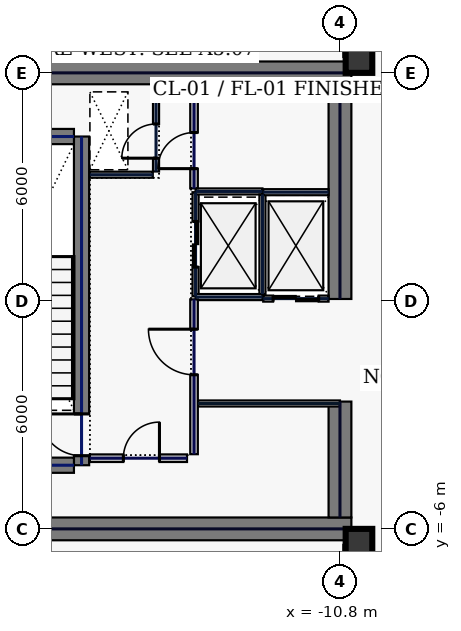
"""IFC4 building model, lengths in metres.
Left out: names, types, materials, properties, quantities, classifications, styles, units other than length and angle.
Written with IfcOpenShell. Run it as: python <this file> out.ifc"""

import sys

from ifc_helpers import new_model, si_unit, direction, frame, frame_2d, origin, origin_2d, place, context, subcontext, project, spatial, rectangle, hollow_rectangle, extrude, element, fill, save


model = new_model("IFC4")
c1 = context("Model", 3, precision=1e-05, world=origin(), true_north=direction((0.0, 1.0)))
c2 = subcontext(c1, "Body", "Model", "MODEL_VIEW")
j1 = project(units=[si_unit("LENGTHUNIT", "METRE"), si_unit("PLANEANGLEUNIT", "RADIAN")], contexts=[c1])
p1 = place(None, origin())
s1 = spatial("IfcSite", under=j1, at=p1, CompositionType="ELEMENT")
p2 = place(p1, origin())
s2 = spatial("IfcBuilding", under=s1, at=p2, CompositionType="ELEMENT")
p3 = place(p2, frame((0.0, 0.0, 321.0)))
s3 = spatial("IfcBuildingStorey", under=s2, at=p3, CompositionType="ELEMENT", Elevation=321.0)
for number, where, z_axis, x_axis in (
    (1, (-22.0, 6.0, 0.0), (0.0, 0.0, 1.0), (1.0, 0.0, 0.0)),
    (2, (-22.0, -6.0, 0.0), (0.0, 0.0, 1.0), (1.0, 0.0, 0.0)),
):
    element("IfcWall", number, at=place(p3, frame(where, z_axis=z_axis, x_axis=x_axis)), inside=s3, PredefinedType="SHEAR", context=c2, shape_type="SweptSolid", body=[
        extrude(rectangle(XDim=11.5, YDim=0.6, at=frame_2d((5.75, 0.0))), origin(), (0.0, 0.0, 1.0), 3.74),
    ])
p4 = place(p3, frame((-10.8, -5.7, 0.0), z_axis=(0.0, 0.0, 1.0), x_axis=(0.0, 1.0, 0.0)))
e3 = element("IfcWall", 3, at=p4, inside=s3, PredefinedType="SHEAR", context=c2, shape_type="SweptSolid", body=[
    extrude(rectangle(XDim=3.05, YDim=0.6, at=frame_2d((1.525, 0.0))), origin(), (0.0, 0.0, 1.0), 3.74),
])
p5 = place(p3, frame((-10.8, 0.05, 0.0), z_axis=(0.0, 0.0, 1.0), x_axis=(0.0, 1.0, 0.0)))
e4 = element("IfcWall", 4, at=p5, inside=s3, PredefinedType="SHEAR", context=c2, shape_type="SweptSolid", body=[
    extrude(rectangle(XDim=5.65, YDim=0.6, at=frame_2d((2.825, 0.0))), origin(), (0.0, 0.0, 1.0), 3.74),
])
p6 = place(p3, frame((-17.6, -4.325, 0.0), z_axis=(0.0, 0.0, 1.0), x_axis=(0.0, 1.0, 0.0)))
e5 = element("IfcWall", 5, at=p6, inside=s3, PredefinedType="SHEAR", context=c2, shape_type="SweptSolid", body=[
    extrude(rectangle(XDim=8.65, YDim=0.4, at=frame_2d((4.325, 0.0))), origin(), (0.0, 0.0, 1.0), 3.74),
])
p7 = place(p6, frame((0.25, 0.0, 0.0)))
e6 = element("IfcOpeningElement", 6, at=p7, cuts=e5, PredefinedType="OPENING", context=c2, shape_type="SweptSolid", body=[
    extrude(rectangle(XDim=1.1, YDim=2.2, at=frame_2d((0.55, 1.1))), frame((0.0, 0.21, 0.0), z_axis=(0.0, -1.0, 0.0), x_axis=(1.0, 0.0, 0.0)), (0.0, 0.0, 1.0), 0.42),
])
for number, where, z_axis, x_axis in (
    (7, (-21.2, -4.325, 0.0), (0.0, 0.0, 1.0), (1.0, 0.0, 0.0)),
    (8, (-21.2, 4.325, 0.0), (0.0, 0.0, 1.0), (1.0, 0.0, 0.0)),
):
    element("IfcWall", number, at=place(p3, frame(where, z_axis=z_axis, x_axis=x_axis)), inside=s3, PredefinedType="SHEAR", context=c2, shape_type="SweptSolid", body=[
        extrude(rectangle(XDim=3.4, YDim=0.4, at=frame_2d((1.7, 0.0))), origin(), (0.0, 0.0, 1.0), 3.74),
    ])
for number, where, z_axis, x_axis in (
    (9, (-10.3, -6.35, 0.0), (0.0, 0.0, 1.0), (1.0, 0.0, 0.0)),
    (10, (-10.3, 6.35, 0.0), (0.0, 0.0, 1.0), (1.0, 0.0, 0.0)),
):
    element("IfcColumn", number, at=place(p3, frame(where, z_axis=z_axis, x_axis=x_axis)), inside=s3, PredefinedType="COLUMN", context=c2, shape_type="SweptSolid", body=[
        extrude(hollow_rectangle(XDim=0.7, YDim=0.7, WallThickness=0.032, at=origin_2d()), origin(), (0.0, 0.0, 1.0), 3.74),
    ])
p8 = place(p3, frame((-14.6, 0.12, 0.0), z_axis=(0.0, 0.0, 1.0), x_axis=(0.0, 1.0, 0.0)))
e11 = element("IfcWall", 11, at=p8, inside=s3, PredefinedType="PARTITIONING", context=c2, shape_type="SweptSolid", body=[
    extrude(rectangle(XDim=2.74, YDim=0.16, at=frame_2d((1.37, 0.0))), origin(), (0.0, 0.0, 1.0), 3.74),
])
p9 = place(p8, frame((0.77, 0.0, 0.0)))
e12 = element("IfcOpeningElement", 12, at=p9, cuts=e11, PredefinedType="OPENING", context=c2, shape_type="SweptSolid", body=[
    extrude(rectangle(XDim=1.2, YDim=2.2, at=frame_2d((0.6, 1.1))), frame((0.0, 0.09, 0.0), z_axis=(0.0, -1.0, 0.0), x_axis=(1.0, 0.0, 0.0)), (0.0, 0.0, 1.0), 0.18),
])
for number, where, z_axis, x_axis in (
    (13, (-14.6, 0.1, 0.0), (0.0, 0.0, 1.0), (1.0, 0.0, 0.0)),
    (14, (-14.6, 2.88, 0.0), (0.0, 0.0, 1.0), (1.0, 0.0, 0.0)),
):
    element("IfcWall", number, at=place(p3, frame(where, z_axis=z_axis, x_axis=x_axis)), inside=s3, PredefinedType="PARTITIONING", context=c2, shape_type="SweptSolid", body=[
        extrude(rectangle(XDim=1.76, YDim=0.16, at=frame_2d((0.88, 0.0))), origin(), (0.0, 0.0, 1.0), 3.74),
    ])
p10 = place(p3, frame((-12.84, 0.18, 0.0), z_axis=(0.0, 0.0, 1.0), x_axis=(0.0, 1.0, 0.0)))
e15 = element("IfcWall", 15, at=p10, inside=s3, PredefinedType="PARTITIONING", context=c2, shape_type="SweptSolid", body=[
    extrude(rectangle(XDim=2.62, YDim=0.16, at=frame_2d((1.31, 0.0))), origin(), (0.0, 0.0, 1.0), 3.74),
])
p11 = place(p3, frame((-12.82, 0.06, 0.0), z_axis=(0.0, 0.0, 1.0), x_axis=(1.0, 0.0, 0.0)))
e16 = element("IfcWall", 16, at=p11, inside=s3, PredefinedType="PARTITIONING", context=c2, shape_type="SweptSolid", body=[
    extrude(rectangle(XDim=1.72, YDim=0.16, at=frame_2d((0.86, 0.0))), origin(), (0.0, 0.0, 1.0), 3.74),
])
p12 = place(p11, frame((0.26, 0.0, 0.0)))
e17 = element("IfcOpeningElement", 17, at=p12, cuts=e16, PredefinedType="OPENING", context=c2, shape_type="SweptSolid", body=[
    extrude(rectangle(XDim=1.2, YDim=2.2, at=frame_2d((0.6, 1.1))), frame((0.0, 0.09, 0.0), z_axis=(0.0, -1.0, 0.0), x_axis=(1.0, 0.0, 0.0)), (0.0, 0.0, 1.0), 0.18),
])
p13 = place(p3, frame((-12.82, 2.86, 0.0), z_axis=(0.0, 0.0, 1.0), x_axis=(1.0, 0.0, 0.0)))
e18 = element("IfcWall", 18, at=p13, inside=s3, PredefinedType="PARTITIONING", context=c2, shape_type="SweptSolid", body=[
    extrude(rectangle(XDim=1.72, YDim=0.16, at=frame_2d((0.86, 0.0))), origin(), (0.0, 0.0, 1.0), 3.74),
])
p14 = place(p3, frame((-15.64, 3.405, 0.0), z_axis=(0.0, 0.0, 1.0), x_axis=(0.0, 1.0, 0.0)))
e19 = element("IfcWall", 19, at=p14, inside=s3, PredefinedType="PARTITIONING", context=c2, shape_type="SweptSolid", body=[
    extrude(rectangle(XDim=2.155, YDim=0.16, at=frame_2d((1.078, 0.0))), origin(), (0.0, 0.0, 1.0), 3.74),
])
p15 = place(p14, frame((0.35, 0.0, 0.0)))
e20 = element("IfcOpeningElement", 20, at=p15, cuts=e19, PredefinedType="OPENING", context=c2, shape_type="SweptSolid", body=[
    extrude(rectangle(XDim=0.9, YDim=2.2, at=frame_2d((0.45, 1.1))), frame((0.0, 0.09, 0.0), z_axis=(0.0, -1.0, 0.0), x_axis=(1.0, 0.0, 0.0)), (0.0, 0.0, 1.0), 0.18),
])
p16 = place(p3, frame((-17.38, 3.32, 0.0), z_axis=(0.0, 0.0, 1.0), x_axis=(1.0, 0.0, 0.0)))
e21 = element("IfcWall", 21, at=p16, inside=s3, PredefinedType="PARTITIONING", context=c2, shape_type="SweptSolid", body=[
    extrude(rectangle(XDim=1.655, YDim=0.16, at=frame_2d((0.827, 0.0))), origin(), (0.0, 0.0, 1.0), 3.74),
])
p17 = place(p3, frame((-17.38, -4.14, 0.0), z_axis=(0.0, 0.0, 1.0), x_axis=(1.0, 0.0, 0.0)))
e22 = element("IfcWall", 22, at=p17, inside=s3, PredefinedType="SOLIDWALL", context=c2, shape_type="SweptSolid", body=[
    extrude(rectangle(XDim=2.555, YDim=0.2, at=frame_2d((1.277, 0.0))), origin(), (0.0, 0.0, 1.0), 3.74),
])
p18 = place(p17, frame((0.88, 0.0, 0.0)))
e23 = element("IfcOpeningElement", 23, at=p18, cuts=e22, PredefinedType="OPENING", context=c2, shape_type="SweptSolid", body=[
    extrude(rectangle(XDim=0.95, YDim=2.2, at=frame_2d((0.475, 1.1))), frame((0.0, 0.11, 0.0), z_axis=(0.0, -1.0, 0.0), x_axis=(1.0, 0.0, 0.0)), (0.0, 0.0, 1.0), 0.22),
])
p19 = place(p3, frame((-14.535, -2.7, 0.0), z_axis=(0.0, 0.0, 1.0), x_axis=(1.0, 0.0, 0.0)))
e24 = element("IfcWall", 24, at=p19, inside=s3, PredefinedType="PARTITIONING", context=c2, shape_type="SweptSolid", body=[
    extrude(rectangle(XDim=3.735, YDim=0.16, at=frame_2d((1.867, 0.0))), origin(), (0.0, 0.0, 1.0), 3.74),
])
p20 = place(p3, frame((-14.64, 2.96, 0.0), z_axis=(0.0, 0.0, 1.0), x_axis=(0.0, 1.0, 0.0)))
e25 = element("IfcWall", 25, at=p20, inside=s3, PredefinedType="SOLIDWALL", context=c2, shape_type="SweptSolid", body=[
    extrude(rectangle(XDim=2.6, YDim=0.2, at=frame_2d((1.3, 0.0))), origin(), (0.0, 0.0, 1.0), 3.74),
])
p21 = place(p20, frame((0.52, 0.0, 0.0)))
e26 = element("IfcOpeningElement", 26, at=p21, cuts=e25, PredefinedType="OPENING", context=c2, shape_type="SweptSolid", body=[
    extrude(rectangle(XDim=0.95, YDim=2.2, at=frame_2d((0.475, 1.1))), frame((0.0, 0.11, 0.0), z_axis=(0.0, -1.0, 0.0), x_axis=(1.0, 0.0, 0.0)), (0.0, 0.0, 1.0), 0.22),
])
p22 = place(p3, frame((-14.64, -4.035, 0.0), z_axis=(0.0, 0.0, 1.0), x_axis=(0.0, 1.0, 0.0)))
e27 = element("IfcWall", 27, at=p22, inside=s3, PredefinedType="SOLIDWALL", context=c2, shape_type="SweptSolid", body=[
    extrude(rectangle(XDim=4.075, YDim=0.2, at=frame_2d((2.038, 0.0))), origin(), (0.0, 0.0, 1.0), 3.74),
])
p23 = place(p22, frame((2.09, 0.0, 0.0)))
e28 = element("IfcOpeningElement", 28, at=p23, cuts=e27, PredefinedType="OPENING", context=c2, shape_type="SweptSolid", body=[
    extrude(rectangle(XDim=1.2, YDim=2.2, at=frame_2d((0.6, 1.1))), frame((0.0, 0.11, 0.0), z_axis=(0.0, -1.0, 0.0), x_axis=(1.0, 0.0, 0.0)), (0.0, 0.0, 1.0), 0.22),
])
p24 = place(p3, frame((-10.63, -6.985, 0.0), z_axis=(0.0, 0.0, 1.0), x_axis=(0.0, 1.0, 0.0)))
e29 = element("IfcWall", 29, at=p24, inside=s3, PredefinedType="PARTITIONING", context=c2, shape_type="SweptSolid", body=[
    extrude(rectangle(XDim=0.565, YDim=0.16, at=frame_2d((0.283, 0.0))), origin(), (0.0, 0.0, 1.0), 3.74),
])
p25 = place(p3, frame((-10.63, 6.42, 0.0), z_axis=(0.0, 0.0, 1.0), x_axis=(0.0, 1.0, 0.0)))
e30 = element("IfcWall", 30, at=p25, inside=s3, PredefinedType="PARTITIONING", context=c2, shape_type="SweptSolid", body=[
    extrude(rectangle(XDim=0.765, YDim=0.16, at=frame_2d((0.383, 0.0))), origin(), (0.0, 0.0, 1.0), 3.74),
])
p26 = place(p7, origin())
e31 = element("IfcDoor", 31, at=p26, inside=s3, OperationType="SINGLE_SWING_RIGHT", PredefinedType="DOOR", context=c2, shape_type="SweptSolid", body=[
    extrude(rectangle(XDim=1.1, YDim=2.2, at=frame_2d((0.55, 1.1))), frame((0.0, 0.025, 0.0), z_axis=(0.0, -1.0, 0.0), x_axis=(1.0, 0.0, 0.0)), (0.0, 0.0, 1.0), 0.05),
])
fill(e6, e31)
p27 = place(p9, origin())
e32 = element("IfcDoor", 32, at=p27, inside=s3, OperationType="SLIDING_TO_LEFT", PredefinedType="DOOR", context=c2, shape_type="SweptSolid", body=[
    extrude(rectangle(XDim=1.2, YDim=2.2, at=frame_2d((0.6, 1.1))), frame((0.0, 0.025, 0.0), z_axis=(0.0, -1.0, 0.0), x_axis=(1.0, 0.0, 0.0)), (0.0, 0.0, 1.0), 0.05),
])
fill(e12, e32)
p28 = place(p12, origin())
e33 = element("IfcDoor", 33, at=p28, inside=s3, OperationType="SLIDING_TO_LEFT", PredefinedType="DOOR", context=c2, shape_type="SweptSolid", body=[
    extrude(rectangle(XDim=1.2, YDim=2.2, at=frame_2d((0.6, 1.1))), frame((0.0, 0.025, 0.0), z_axis=(0.0, -1.0, 0.0), x_axis=(1.0, 0.0, 0.0)), (0.0, 0.0, 1.0), 0.05),
])
fill(e17, e33)
p29 = place(p15, origin())
e34 = element("IfcDoor", 34, at=p29, inside=s3, OperationType="SINGLE_SWING_LEFT", PredefinedType="DOOR", context=c2, shape_type="SweptSolid", body=[
    extrude(rectangle(XDim=0.9, YDim=2.2, at=frame_2d((0.45, 1.1))), frame((0.0, 0.025, 0.0), z_axis=(0.0, -1.0, 0.0), x_axis=(1.0, 0.0, 0.0)), (0.0, 0.0, 1.0), 0.05),
])
fill(e20, e34)
p30 = place(p18, origin())
e35 = element("IfcDoor", 35, at=p30, inside=s3, OperationType="SINGLE_SWING_RIGHT", PredefinedType="DOOR", context=c2, shape_type="SweptSolid", body=[
    extrude(rectangle(XDim=0.95, YDim=2.2, at=frame_2d((0.475, 1.1))), frame((0.0, 0.025, 0.0), z_axis=(0.0, -1.0, 0.0), x_axis=(1.0, 0.0, 0.0)), (0.0, 0.0, 1.0), 0.05),
])
fill(e23, e35)
p31 = place(p21, origin())
e36 = element("IfcDoor", 36, at=p31, inside=s3, OperationType="SINGLE_SWING_LEFT", PredefinedType="DOOR", context=c2, shape_type="SweptSolid", body=[
    extrude(rectangle(XDim=0.95, YDim=2.2, at=frame_2d((0.475, 1.1))), frame((0.0, 0.025, 0.0), z_axis=(0.0, -1.0, 0.0), x_axis=(1.0, 0.0, 0.0)), (0.0, 0.0, 1.0), 0.05),
])
fill(e26, e36)
p32 = place(p23, origin())
e37 = element("IfcDoor", 37, at=p32, inside=s3, OperationType="SINGLE_SWING_RIGHT", PredefinedType="DOOR", context=c2, shape_type="SweptSolid", body=[
    extrude(rectangle(XDim=1.2, YDim=2.2, at=frame_2d((0.6, 1.1))), frame((0.0, 0.025, 0.0), z_axis=(0.0, -1.0, 0.0), x_axis=(1.0, 0.0, 0.0)), (0.0, 0.0, 1.0), 0.05),
])
fill(e28, e37)
save(model, sys.argv[1])
